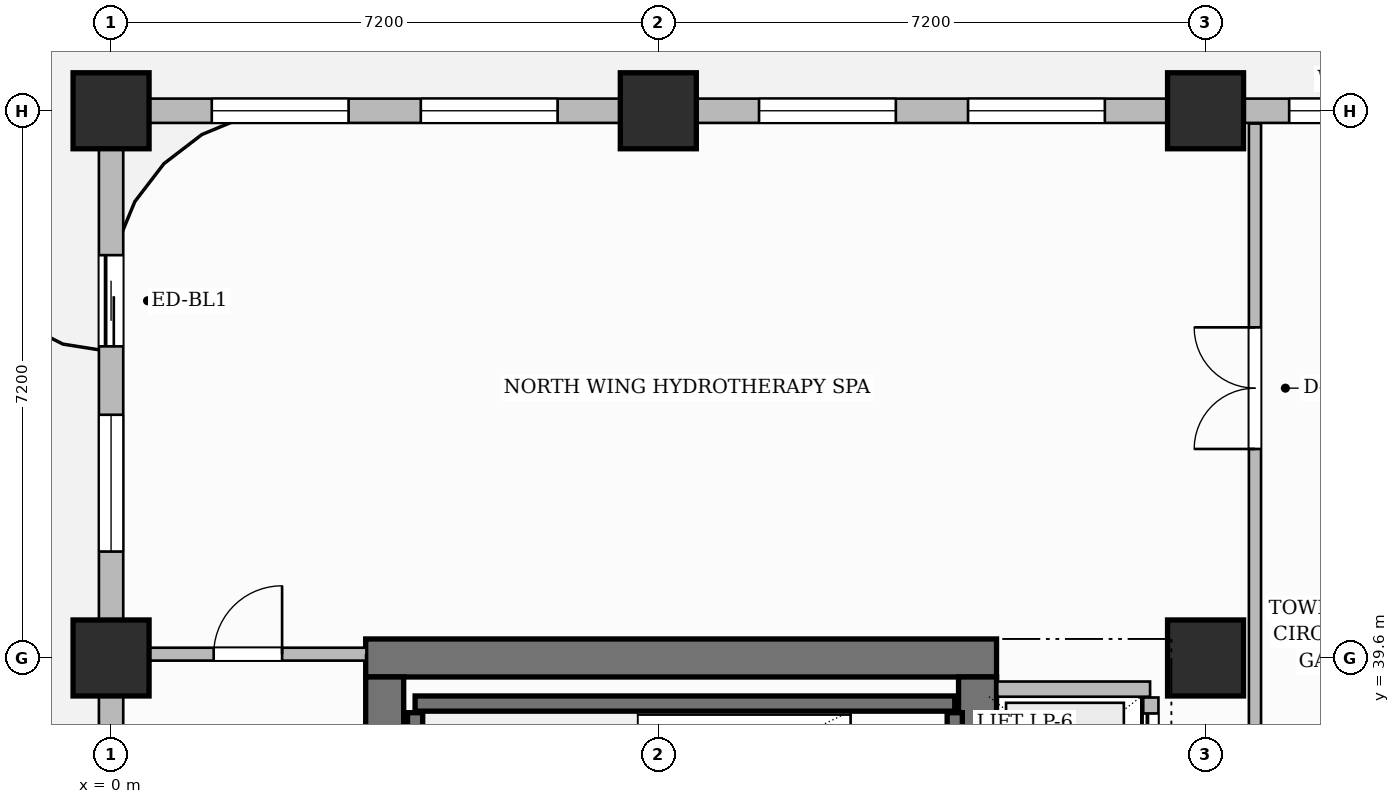
"""IFC4 building model, lengths in metres.
Left out: names, types, materials, properties, quantities, classifications, styles, units other than length and angle.
Written with IfcOpenShell. Run it as: python <this file> out.ifc"""

import sys

from ifc_helpers import new_model, si_unit, direction, frame, frame_2d, origin, origin_2d, place, context, subcontext, project, spatial, rectangle, extrude, source, transform, mapped, element, fill, save


model = new_model("IFC4")
c1 = context("Model", 3, precision=1e-05, world=origin(), true_north=direction((0.0, 1.0)))
c2 = subcontext(c1, "Body", "Model", "MODEL_VIEW")
j1 = project(units=[si_unit("LENGTHUNIT", "METRE"), si_unit("PLANEANGLEUNIT", "RADIAN")], contexts=[c1])
p1 = place(None, origin())
s1 = spatial("IfcSite", under=j1, at=p1, CompositionType="ELEMENT")
p2 = place(p1, origin())
s2 = spatial("IfcBuilding", under=s1, at=p2, CompositionType="ELEMENT")
p3 = place(p2, frame((0.0, 0.0, 154.15)))
s3 = spatial("IfcBuildingStorey", under=s2, at=p3, CompositionType="ELEMENT", Elevation=154.15)
p4 = place(p3, frame((3.35, 39.6, 0.0), z_axis=(0.0, 0.0, 1.0), x_axis=(1.0, 0.0, 0.0)))
e1 = element("IfcWall", 1, at=p4, inside=s3, PredefinedType="SHEAR", context=c2, shape_type="SweptSolid", body=[
    extrude(rectangle(XDim=8.3, YDim=0.5, at=frame_2d((4.15, 0.0))), origin(), (0.0, 0.0, 1.0), 3.85),
])
p5 = place(p3, frame((3.6, 25.45, 0.0), z_axis=(0.0, 0.0, 1.0), x_axis=(0.0, 1.0, 0.0)))
e2 = element("IfcWall", 2, at=p5, inside=s3, PredefinedType="SHEAR", context=c2, shape_type="SweptSolid", body=[
    extrude(rectangle(XDim=13.9, YDim=0.5, at=frame_2d((6.95, 0.0))), origin(), (0.0, 0.0, 1.0), 3.85),
])
p6 = place(p3, frame((11.4, 25.45, 0.0), z_axis=(0.0, 0.0, 1.0), x_axis=(0.0, 1.0, 0.0)))
e3 = element("IfcWall", 3, at=p6, inside=s3, PredefinedType="SHEAR", context=c2, shape_type="SweptSolid", body=[
    extrude(rectangle(XDim=13.9, YDim=0.5, at=frame_2d((6.95, 0.0))), origin(), (0.0, 0.0, 1.0), 3.85),
])
p7 = place(p6, frame((6.52, 0.0, 0.0)))
e4 = element("IfcOpeningElement", 4, at=p7, cuts=e3, PredefinedType="OPENING", context=c2, shape_type="SweptSolid", body=[
    extrude(rectangle(XDim=1.5, YDim=2.2, at=frame_2d((0.75, 1.1))), frame((0.0, 0.26, 0.0), z_axis=(0.0, -1.0, 0.0), x_axis=(1.0, 0.0, 0.0)), (0.0, 0.0, 1.0), 0.52),
])
m1 = source(origin(), c2, "Body", "SweptSolid", [
    extrude(rectangle(XDim=1.0, YDim=1.0, at=origin_2d()), origin(), (0.0, 0.0, 1.0), 3.85),
])
for number, where, z_axis, x_axis in (
    (5, (0.0, 39.6, 0.0), (0.0, 0.0, 1.0), (1.0, 0.0, 0.0)),
    (6, (0.0, 46.8, 0.0), (0.0, 0.0, 1.0), (1.0, 0.0, 0.0)),
    (7, (7.2, 46.8, 0.0), (0.0, 0.0, 1.0), (1.0, 0.0, 0.0)),
    (8, (14.4, 39.6, 0.0), (0.0, 0.0, 1.0), (1.0, 0.0, 0.0)),
    (9, (14.4, 46.8, 0.0), (0.0, 0.0, 1.0), (1.0, 0.0, 0.0)),
):
    element("IfcColumn", number, at=place(p3, frame(where, z_axis=z_axis, x_axis=x_axis)), inside=s3, PredefinedType="COLUMN", context=c2, shape_type="MappedRepresentation", body=[
        mapped(m1, transform((0.0, 0.0, 0.0), scale=1.0)),
    ])
p8 = place(p3, frame((4.0, 39.0, 0.0), z_axis=(0.0, 0.0, 1.0), x_axis=(1.0, 0.0, 0.0)))
e10 = element("IfcWall", 10, at=p8, inside=s3, PredefinedType="SHEAR", context=c2, shape_type="SweptSolid", body=[
    extrude(rectangle(XDim=7.1, YDim=0.2, at=frame_2d((3.55, 0.0))), origin(), (0.0, 0.0, 1.0), 3.85),
])
for number, where, z_axis, x_axis in (
    (11, (4.0, 36.18, 0.0), (0.0, 0.0, 1.0), (0.0, 1.0, 0.0)),
    (12, (11.1, 36.18, 0.0), (0.0, 0.0, 1.0), (0.0, 1.0, 0.0)),
):
    element("IfcWall", number, at=place(p3, frame(where, z_axis=z_axis, x_axis=x_axis)), inside=s3, PredefinedType="SHEAR", context=c2, shape_type="SweptSolid", body=[
        extrude(rectangle(XDim=2.7, YDim=0.2, at=frame_2d((1.35, 0.0))), origin(), (0.0, 0.0, 1.0), 3.85),
    ])
p9 = place(p3, frame((11.66, 39.19, 0.0), z_axis=(0.0, 0.0, 1.0), x_axis=(1.0, 0.0, 0.0)))
e13 = element("IfcWall", 13, at=p9, inside=s3, PredefinedType="PARTITIONING", context=c2, shape_type="SweptSolid", body=[
    extrude(rectangle(XDim=2.01, YDim=0.2, at=frame_2d((1.005, 0.0))), origin(), (0.0, 0.0, 1.0), 3.6),
])
p10 = place(p3, frame((13.68, 34.36, 0.0), z_axis=(0.0, 0.0, 1.0), x_axis=(0.0, 1.0, 0.0)))
e14 = element("IfcWall", 14, at=p10, inside=s3, PredefinedType="PARTITIONING", context=c2, shape_type="SweptSolid", body=[
    extrude(rectangle(XDim=4.72, YDim=0.2, at=frame_2d((2.36, 0.0))), origin(), (0.0, 0.0, 1.0), 3.6),
])
p11 = place(p10, frame((0.21, 0.0, 0.0)))
e15 = element("IfcOpeningElement", 15, at=p11, cuts=e14, PredefinedType="OPENING", context=c2, shape_type="SweptSolid", body=[
    extrude(rectangle(XDim=1.1, YDim=2.2, at=frame_2d((0.55, 1.1))), frame((0.0, 0.11, 0.0), z_axis=(0.0, -1.0, 0.0), x_axis=(1.0, 0.0, 0.0)), (0.0, 0.0, 1.0), 0.22),
])
p12 = place(p10, frame((1.81, 0.0, 0.0)))
e16 = element("IfcOpeningElement", 16, at=p12, cuts=e14, PredefinedType="OPENING", context=c2, shape_type="SweptSolid", body=[
    extrude(rectangle(XDim=1.1, YDim=2.2, at=frame_2d((0.55, 1.1))), frame((0.0, 0.11, 0.0), z_axis=(0.0, -1.0, 0.0), x_axis=(1.0, 0.0, 0.0)), (0.0, 0.0, 1.0), 0.22),
])
p13 = place(p10, frame((3.41, 0.0, 0.0)))
e17 = element("IfcOpeningElement", 17, at=p13, cuts=e14, PredefinedType="OPENING", context=c2, shape_type="SweptSolid", body=[
    extrude(rectangle(XDim=1.1, YDim=2.2, at=frame_2d((0.55, 1.1))), frame((0.0, 0.11, 0.0), z_axis=(0.0, -1.0, 0.0), x_axis=(1.0, 0.0, 0.0)), (0.0, 0.0, 1.0), 0.22),
])
p14 = place(p3, frame((0.24, 39.65, 0.0), z_axis=(0.0, 0.0, 1.0), x_axis=(1.0, 0.0, 0.0)))
e18 = element("IfcWall", 18, at=p14, inside=s3, PredefinedType="PARTITIONING", context=c2, shape_type="SweptSolid", body=[
    extrude(rectangle(XDim=3.12, YDim=0.17, at=frame_2d((1.56, 0.0))), origin(), (0.0, 0.0, 1.0), 3.6),
])
p15 = place(p14, frame((1.11, 0.0, 0.0)))
e19 = element("IfcOpeningElement", 19, at=p15, cuts=e18, PredefinedType="OPENING", context=c2, shape_type="SweptSolid", body=[
    extrude(rectangle(XDim=0.9, YDim=2.15, at=frame_2d((0.45, 1.075))), frame((0.0, 0.095, 0.0), z_axis=(0.0, -1.0, 0.0), x_axis=(1.0, 0.0, 0.0)), (0.0, 0.0, 1.0), 0.19),
])
p16 = place(p3, frame((15.05, 34.34, 0.0), z_axis=(0.0, 0.0, 1.0), x_axis=(0.0, 1.0, 0.0)))
e20 = element("IfcWall", 20, at=p16, inside=s3, PredefinedType="PARTITIONING", context=c2, shape_type="SweptSolid", body=[
    extrude(rectangle(XDim=12.292, YDim=0.16, at=frame_2d((6.146, 0.0))), origin(), (0.0, 0.0, 1.0), 3.6),
])
p17 = place(p16, frame((8.01, 0.0, 0.0)))
e21 = element("IfcOpeningElement", 21, at=p17, cuts=e20, PredefinedType="OPENING", context=c2, shape_type="SweptSolid", body=[
    extrude(rectangle(XDim=1.6, YDim=2.4, at=frame_2d((0.8, 1.2))), frame((0.0, 0.09, 0.0), z_axis=(0.0, -1.0, 0.0), x_axis=(1.0, 0.0, 0.0)), (0.0, 0.0, 1.0), 0.18),
])
p18 = place(p3, frame((0.0, 25.25, 0.0), z_axis=(0.0, 0.0, 1.0), x_axis=(0.0, 1.0, 0.0)))
e22 = element("IfcWall", 22, at=p18, inside=s3, PredefinedType="SOLIDWALL", context=c2, shape_type="SweptSolid", body=[
    extrude(rectangle(XDim=21.5, YDim=0.32, at=frame_2d((10.75, 0.0))), origin(), (0.0, 0.0, 1.0), 3.085),
])
p19 = place(p18, frame((18.45, 0.0, 0.0)))
e23 = element("IfcOpeningElement", 23, at=p19, cuts=e22, PredefinedType="OPENING", context=c2, shape_type="SweptSolid", body=[
    extrude(rectangle(XDim=1.2, YDim=2.2, at=frame_2d((0.6, 1.1))), frame((0.0, 0.17, 0.0), z_axis=(0.0, -1.0, 0.0), x_axis=(1.0, 0.0, 0.0)), (0.0, 0.0, 1.0), 0.34),
])
p20 = place(p18, frame((0.8, 0.0, 0.0)))
e24 = element("IfcOpeningElement", 24, at=p20, cuts=e22, PredefinedType="OPENING", context=c2, shape_type="SweptSolid", body=[
    extrude(rectangle(XDim=1.2, YDim=2.2, at=frame_2d((0.6, 1.1))), frame((0.0, 0.17, 0.0), z_axis=(0.0, -1.0, 0.0), x_axis=(1.0, 0.0, 0.0)), (0.0, 0.0, 1.0), 0.34),
])
p21 = place(p18, frame((3.425, 0.0, 0.8)))
e25 = element("IfcOpeningElement", 25, at=p21, cuts=e22, PredefinedType="OPENING", context=c2, shape_type="SweptSolid", body=[
    extrude(rectangle(XDim=1.8, YDim=1.85, at=frame_2d((0.9, 0.925))), frame((0.0, 0.17, 0.0), z_axis=(0.0, -1.0, 0.0), x_axis=(1.0, 0.0, 0.0)), (0.0, 0.0, 1.0), 0.34),
])
p22 = place(p18, frame((8.475, 0.0, 0.8)))
e26 = element("IfcOpeningElement", 26, at=p22, cuts=e22, PredefinedType="OPENING", context=c2, shape_type="SweptSolid", body=[
    extrude(rectangle(XDim=1.8, YDim=1.85, at=frame_2d((0.9, 0.925))), frame((0.0, 0.17, 0.0), z_axis=(0.0, -1.0, 0.0), x_axis=(1.0, 0.0, 0.0)), (0.0, 0.0, 1.0), 0.34),
])
p23 = place(p18, frame((11.225, 0.0, 0.8)))
e27 = element("IfcOpeningElement", 27, at=p23, cuts=e22, PredefinedType="OPENING", context=c2, shape_type="SweptSolid", body=[
    extrude(rectangle(XDim=1.8, YDim=1.85, at=frame_2d((0.9, 0.925))), frame((0.0, 0.17, 0.0), z_axis=(0.0, -1.0, 0.0), x_axis=(1.0, 0.0, 0.0)), (0.0, 0.0, 1.0), 0.34),
])
p24 = place(p18, frame((15.75, 0.0, 0.8)))
e28 = element("IfcOpeningElement", 28, at=p24, cuts=e22, PredefinedType="OPENING", context=c2, shape_type="SweptSolid", body=[
    extrude(rectangle(XDim=1.8, YDim=1.85, at=frame_2d((0.9, 0.925))), frame((0.0, 0.17, 0.0), z_axis=(0.0, -1.0, 0.0), x_axis=(1.0, 0.0, 0.0)), (0.0, 0.0, 1.0), 0.34),
])
p25 = place(p3, frame((0.0, 46.8, 0.0), z_axis=(0.0, 0.0, 1.0), x_axis=(1.0, 0.0, 0.0)))
e29 = element("IfcWall", 29, at=p25, inside=s3, PredefinedType="SOLIDWALL", context=c2, shape_type="SweptSolid", body=[
    extrude(rectangle(XDim=18.0, YDim=0.32, at=frame_2d((9.0, 0.0))), origin(), (0.0, 0.0, 1.0), 3.085),
])
p26 = place(p25, frame((1.325, 0.0, 0.8)))
e30 = element("IfcOpeningElement", 30, at=p26, cuts=e29, PredefinedType="OPENING", context=c2, shape_type="SweptSolid", body=[
    extrude(rectangle(XDim=1.8, YDim=1.85, at=frame_2d((0.9, 0.925))), frame((0.0, 0.17, 0.0), z_axis=(0.0, -1.0, 0.0), x_axis=(1.0, 0.0, 0.0)), (0.0, 0.0, 1.0), 0.34),
])
p27 = place(p25, frame((4.075, 0.0, 0.8)))
e31 = element("IfcOpeningElement", 31, at=p27, cuts=e29, PredefinedType="OPENING", context=c2, shape_type="SweptSolid", body=[
    extrude(rectangle(XDim=1.8, YDim=1.85, at=frame_2d((0.9, 0.925))), frame((0.0, 0.17, 0.0), z_axis=(0.0, -1.0, 0.0), x_axis=(1.0, 0.0, 0.0)), (0.0, 0.0, 1.0), 0.34),
])
p28 = place(p25, frame((8.525, 0.0, 0.8)))
e32 = element("IfcOpeningElement", 32, at=p28, cuts=e29, PredefinedType="OPENING", context=c2, shape_type="SweptSolid", body=[
    extrude(rectangle(XDim=1.8, YDim=1.85, at=frame_2d((0.9, 0.925))), frame((0.0, 0.17, 0.0), z_axis=(0.0, -1.0, 0.0), x_axis=(1.0, 0.0, 0.0)), (0.0, 0.0, 1.0), 0.34),
])
p29 = place(p25, frame((11.275, 0.0, 0.8)))
e33 = element("IfcOpeningElement", 33, at=p29, cuts=e29, PredefinedType="OPENING", context=c2, shape_type="SweptSolid", body=[
    extrude(rectangle(XDim=1.8, YDim=1.85, at=frame_2d((0.9, 0.925))), frame((0.0, 0.17, 0.0), z_axis=(0.0, -1.0, 0.0), x_axis=(1.0, 0.0, 0.0)), (0.0, 0.0, 1.0), 0.34),
])
p30 = place(p25, frame((15.5, 0.0, 0.8)))
e34 = element("IfcOpeningElement", 34, at=p30, cuts=e29, PredefinedType="OPENING", context=c2, shape_type="SweptSolid", body=[
    extrude(rectangle(XDim=1.4, YDim=1.85, at=frame_2d((0.7, 0.925))), frame((0.0, 0.17, 0.0), z_axis=(0.0, -1.0, 0.0), x_axis=(1.0, 0.0, 0.0)), (0.0, 0.0, 1.0), 0.34),
])
m2 = source(origin(), c2, "Body", "SweptSolid", [
    extrude(rectangle(XDim=0.9, YDim=2.15, at=frame_2d((0.45, 1.075))), frame((0.0, 0.025, 0.0), z_axis=(0.0, -1.0, 0.0), x_axis=(1.0, 0.0, 0.0)), (0.0, 0.0, 1.0), 0.05),
])
p31 = place(p15, origin())
e35 = element("IfcDoor", 35, at=p31, inside=s3, OperationType="SINGLE_SWING_RIGHT", PredefinedType="DOOR", context=c2, shape_type="MappedRepresentation", body=[
    mapped(m2, transform((0.0, 0.0, 0.0), scale=1.0)),
])
fill(e19, e35)
m3 = source(origin(), c2, "Body", "SweptSolid", [
    extrude(rectangle(XDim=1.6, YDim=2.4, at=frame_2d((0.8, 1.2))), frame((0.0, 0.025, 0.0), z_axis=(0.0, -1.0, 0.0), x_axis=(1.0, 0.0, 0.0)), (0.0, 0.0, 1.0), 0.05),
])
p32 = place(p17, origin())
e36 = element("IfcDoor", 36, at=p32, inside=s3, OperationType="DOUBLE_DOOR_SINGLE_SWING", PredefinedType="DOOR", context=c2, shape_type="MappedRepresentation", body=[
    mapped(m3, transform((0.0, 0.0, 0.0), scale=1.0)),
])
fill(e21, e36)
m4 = source(origin(), c2, "Body", "SweptSolid", [
    extrude(rectangle(XDim=1.1, YDim=2.2, at=frame_2d((0.55, 1.1))), frame((0.0, 0.025, 0.0), z_axis=(0.0, -1.0, 0.0), x_axis=(1.0, 0.0, 0.0)), (0.0, 0.0, 1.0), 0.05),
])
p33 = place(p13, origin())
e37 = element("IfcDoor", 37, at=p33, inside=s3, OperationType="SLIDING_TO_LEFT", PredefinedType="DOOR", context=c2, shape_type="MappedRepresentation", body=[
    mapped(m4, transform((0.0, 0.0, 0.0), scale=1.0)),
])
fill(e17, e37)
m5 = source(origin(), c2, "Body", "SweptSolid", [
    extrude(rectangle(XDim=1.2, YDim=2.2, at=frame_2d((0.6, 1.1))), frame((0.0, 0.025, 0.0), z_axis=(0.0, -1.0, 0.0), x_axis=(1.0, 0.0, 0.0)), (0.0, 0.0, 1.0), 0.05),
])
p34 = place(p19, origin())
e38 = element("IfcDoor", 38, at=p34, inside=s3, OperationType="SLIDING_TO_LEFT", PredefinedType="DOOR", context=c2, shape_type="MappedRepresentation", body=[
    mapped(m5, transform((0.0, 0.0, 0.0), scale=1.0)),
])
fill(e23, e38)
m6 = source(origin(), c2, "Body", "SweptSolid", [
    extrude(rectangle(XDim=1.8, YDim=1.85, at=frame_2d((0.9, 0.925))), frame((0.0, 0.03, 0.0), z_axis=(0.0, -1.0, 0.0), x_axis=(1.0, 0.0, 0.0)), (0.0, 0.0, 1.0), 0.06),
])
p35 = place(p24, origin())
e39 = element("IfcWindow", 39, at=p35, inside=s3, PartitioningType="DOUBLE_PANEL_VERTICAL", PredefinedType="WINDOW", context=c2, shape_type="MappedRepresentation", body=[
    mapped(m6, transform((0.0, 0.0, 0.0), scale=1.0)),
])
fill(e28, e39)
p36 = place(p26, origin())
e40 = element("IfcWindow", 40, at=p36, inside=s3, PartitioningType="DOUBLE_PANEL_VERTICAL", PredefinedType="WINDOW", context=c2, shape_type="MappedRepresentation", body=[
    mapped(m6, transform((0.0, 0.0, 0.0), scale=1.0)),
])
fill(e30, e40)
p37 = place(p27, origin())
e41 = element("IfcWindow", 41, at=p37, inside=s3, PartitioningType="DOUBLE_PANEL_VERTICAL", PredefinedType="WINDOW", context=c2, shape_type="MappedRepresentation", body=[
    mapped(m6, transform((0.0, 0.0, 0.0), scale=1.0)),
])
fill(e31, e41)
p38 = place(p28, origin())
e42 = element("IfcWindow", 42, at=p38, inside=s3, PartitioningType="DOUBLE_PANEL_VERTICAL", PredefinedType="WINDOW", context=c2, shape_type="MappedRepresentation", body=[
    mapped(m6, transform((0.0, 0.0, 0.0), scale=1.0)),
])
fill(e32, e42)
p39 = place(p29, origin())
e43 = element("IfcWindow", 43, at=p39, inside=s3, PartitioningType="DOUBLE_PANEL_VERTICAL", PredefinedType="WINDOW", context=c2, shape_type="MappedRepresentation", body=[
    mapped(m6, transform((0.0, 0.0, 0.0), scale=1.0)),
])
fill(e33, e43)
m7 = source(origin(), c2, "Body", "SweptSolid", [
    extrude(rectangle(XDim=1.4, YDim=1.85, at=frame_2d((0.7, 0.925))), frame((0.0, 0.03, 0.0), z_axis=(0.0, -1.0, 0.0), x_axis=(1.0, 0.0, 0.0)), (0.0, 0.0, 1.0), 0.06),
])
p40 = place(p30, origin())
e44 = element("IfcWindow", 44, at=p40, inside=s3, PartitioningType="SINGLE_PANEL", PredefinedType="WINDOW", context=c2, shape_type="MappedRepresentation", body=[
    mapped(m7, transform((0.0, 0.0, 0.0), scale=1.0)),
])
fill(e34, e44)
save(model, sys.argv[1])
